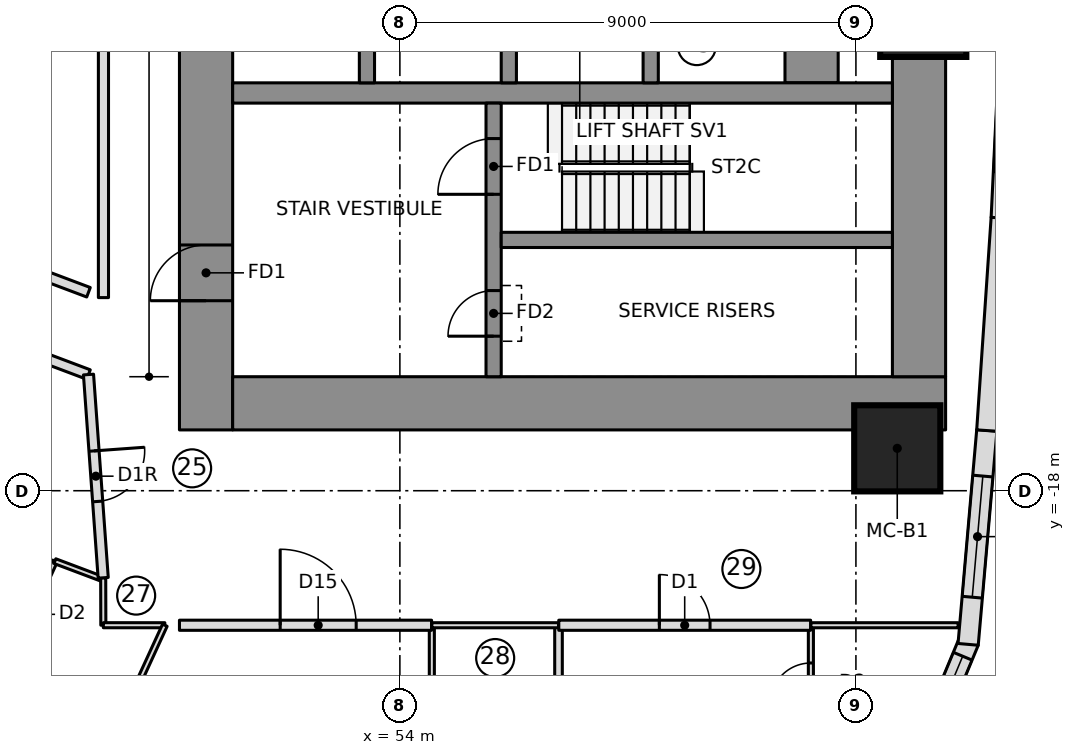
"""IFC4 building model, lengths in metres.
Left out: names, types, materials, properties, quantities, classifications, styles, units other than length and angle.
Written with IfcOpenShell. Run it as: python <this file> out.ifc"""

import sys

from ifc_helpers import new_model, si_unit, direction, frame, frame_2d, origin, origin_2d, place, context, subcontext, project, spatial, polyline, rectangle, outline, extrude, element, fill, save


model = new_model("IFC4")
c1 = context("Model", 3, precision=1e-05, world=origin(), true_north=direction((0.0, 1.0)))
c2 = subcontext(c1, "Body", "Model", "MODEL_VIEW")
j1 = project(units=[si_unit("LENGTHUNIT", "METRE"), si_unit("PLANEANGLEUNIT", "RADIAN")], contexts=[c1])
p1 = place(None, origin())
s1 = spatial("IfcSite", under=j1, at=p1, CompositionType="ELEMENT")
p2 = place(p1, origin())
s2 = spatial("IfcBuilding", under=s1, at=p2, CompositionType="ELEMENT")
p3 = place(p2, frame((0.0, 0.0, 88.45)))
s3 = spatial("IfcBuildingStorey", under=s2, at=p3, CompositionType="ELEMENT", Elevation=88.45)
p4 = place(p3, frame((50.175, -16.8, 0.0), z_axis=(0.0, 0.0, 1.0), x_axis=(0.0, 1.0, 0.0)))
e1 = element("IfcWall", 1, at=p4, inside=s3, PredefinedType="SHEAR", context=c2, shape_type="SweptSolid", body=[
    extrude(rectangle(XDim=10.15, YDim=1.05, at=frame_2d((5.075, 0.0))), origin(), (0.0, 0.0, 1.0), 3.55),
])
p5 = place(p4, frame((2.55, 0.0, 0.0)))
e2 = element("IfcOpeningElement", 2, at=p5, cuts=e1, PredefinedType="OPENING", context=c2, shape_type="SweptSolid", body=[
    extrude(rectangle(XDim=1.1, YDim=2.1, at=frame_2d((0.55, 1.05))), frame((0.0, 0.535, 0.0), z_axis=(0.0, -1.0, 0.0), x_axis=(1.0, 0.0, 0.0)), (0.0, 0.0, 1.0), 1.07),
])
p6 = place(p3, frame((50.7, -16.275, 0.0), z_axis=(0.0, 0.0, 1.0), x_axis=(1.0, 0.0, 0.0)))
e3 = element("IfcWall", 3, at=p6, inside=s3, PredefinedType="SHEAR", context=c2, shape_type="SweptSolid", body=[
    extrude(rectangle(XDim=14.07, YDim=1.05, at=frame_2d((7.035, 0.0))), origin(), (0.0, 0.0, 1.0), 3.55),
])
p7 = place(p3, frame((64.245, -15.75, 0.0), z_axis=(0.0, 0.0, 1.0), x_axis=(0.0, 1.0, 0.0)))
e4 = element("IfcWall", 4, at=p7, inside=s3, PredefinedType="SHEAR", context=c2, shape_type="SweptSolid", body=[
    extrude(rectangle(XDim=6.361, YDim=1.05, at=frame_2d((3.181, 0.0))), origin(), (0.0, 0.0, 1.0), 3.55),
])
p8 = place(p3, frame((62.125, -9.95, 0.0), z_axis=(0.0, 0.0, 1.0), x_axis=(0.0, 1.0, 0.0)))
e5 = element("IfcWall", 5, at=p8, inside=s3, PredefinedType="SHEAR", context=c2, shape_type="SweptSolid", body=[
    extrude(rectangle(XDim=19.9, YDim=1.05, at=frame_2d((9.95, 0.0))), origin(), (0.0, 0.0, 1.0), 3.55),
])
p9 = place(p3, frame((50.7, -10.15, 0.0), z_axis=(0.0, 0.0, 1.0), x_axis=(1.0, 0.0, 0.0)))
e6 = element("IfcWall", 6, at=p9, inside=s3, PredefinedType="SHEAR", context=c2, shape_type="SweptSolid", body=[
    extrude(rectangle(XDim=13.02, YDim=0.4, at=frame_2d((6.51, 0.0))), origin(), (0.0, 0.0, 1.0), 3.55),
])
for number, where, z_axis, x_axis in (
    (7, (53.35, -9.95, 0.0), (0.0, 0.0, 1.0), (0.0, 1.0, 0.0)),
    (8, (56.15, -9.95, 0.0), (0.0, 0.0, 1.0), (0.0, 1.0, 0.0)),
    (9, (58.95, -9.95, 0.0), (0.0, 0.0, 1.0), (0.0, 1.0, 0.0)),
):
    element("IfcWall", number, at=place(p3, frame(where, z_axis=z_axis, x_axis=x_axis)), inside=s3, PredefinedType="SHEAR", context=c2, shape_type="SweptSolid", body=[
        extrude(rectangle(XDim=3.0, YDim=0.3, at=frame_2d((1.5, 0.0))), origin(), (0.0, 0.0, 1.0), 3.55),
    ])
p10 = place(p3, frame((55.85, -15.75, 0.0), z_axis=(0.0, 0.0, 1.0), x_axis=(0.0, 1.0, 0.0)))
e10 = element("IfcWall", 10, at=p10, inside=s3, PredefinedType="SHEAR", context=c2, shape_type="SweptSolid", body=[
    extrude(rectangle(XDim=5.4, YDim=0.3, at=frame_2d((2.7, 0.0))), origin(), (0.0, 0.0, 1.0), 3.55),
])
p11 = place(p10, frame((3.6, 0.0, 0.0)))
e11 = element("IfcOpeningElement", 11, at=p11, cuts=e10, PredefinedType="OPENING", context=c2, shape_type="SweptSolid", body=[
    extrude(rectangle(XDim=1.1, YDim=2.1, at=frame_2d((0.55, 1.05))), frame((0.0, 0.16, 0.0), z_axis=(0.0, -1.0, 0.0), x_axis=(1.0, 0.0, 0.0)), (0.0, 0.0, 1.0), 0.32),
])
p12 = place(p10, frame((0.8, 0.0, 0.0)))
e12 = element("IfcOpeningElement", 12, at=p12, cuts=e10, PredefinedType="OPENING", context=c2, shape_type="SweptSolid", body=[
    extrude(rectangle(XDim=0.9, YDim=2.1, at=frame_2d((0.45, 1.05))), frame((0.0, 0.16, 0.0), z_axis=(0.0, -1.0, 0.0), x_axis=(1.0, 0.0, 0.0)), (0.0, 0.0, 1.0), 0.32),
])
p13 = place(p3, frame((56.0, -13.05, 0.0), z_axis=(0.0, 0.0, 1.0), x_axis=(1.0, 0.0, 0.0)))
e13 = element("IfcWall", 13, at=p13, inside=s3, PredefinedType="SHEAR", context=c2, shape_type="SweptSolid", body=[
    extrude(rectangle(XDim=7.72, YDim=0.3, at=frame_2d((3.86, 0.0))), origin(), (0.0, 0.0, 1.0), 3.55),
])
for number, where, z_axis, x_axis in (
    (14, (63.816, -17.164, 0.0), (0.0, 0.0, 1.0), (1.0, 0.0, 0.0)),
    (15, (64.329, -8.589, 0.0), (0.0, 0.0, 1.0), (1.0, 0.0, 0.0)),
):
    element("IfcColumn", number, at=place(p3, frame(where, z_axis=z_axis, x_axis=x_axis)), inside=s3, PredefinedType="COLUMN", context=c2, shape_type="SweptSolid", body=[
        extrude(rectangle(XDim=1.7, YDim=1.7, at=origin_2d()), origin(), (0.0, 0.0, 1.0), 3.55),
    ])
p14 = place(p3, frame((63.59, -24.916, 0.0), z_axis=(0.0, 0.0, 1.0), x_axis=(0.383997751971, 0.923334027577, 0.0)))
e16 = element("IfcWall", 16, at=p14, inside=s3, PredefinedType="NOTDEFINED", context=c2, shape_type="SweptSolid", body=[
    extrude(outline(polyline([(-0.061, -0.2), (4.27, -0.2), (4.208, 0.2), (0.061, 0.2), (-0.061, -0.2)])), origin(), (0.0, 0.0, 1.0), 3.25),
])
p15 = place(p14, frame((1.852, 0.0, 0.6)))
e17 = element("IfcOpeningElement", 17, at=p15, cuts=e16, PredefinedType="OPENING", context=c2, shape_type="SweptSolid", body=[
    extrude(outline(polyline([(0.0, 1.4), (0.08, 1.802), (0.308, 2.142), (0.648, 2.37), (1.05, 2.45), (1.452, 2.37), (1.792, 2.142), (2.02, 1.802), (2.1, 1.4), (2.1, 1.05), (2.02, 0.648), (1.792, 0.308), (1.452, 0.08), (1.05, 0.0), (0.648, 0.08), (0.308, 0.308), (0.08, 0.648), (0.0, 1.05), (0.0, 1.4)])), frame((0.0, 0.21, 0.0), z_axis=(0.0, -1.0, 0.0), x_axis=(1.0, 0.0, 0.0)), (0.0, 0.0, 1.0), 0.42),
])
p16 = place(p3, frame((65.217, -21.002, 0.0), z_axis=(0.0, 0.0, 1.0), x_axis=(0.086992730434, 0.996208946382, 0.0)))
e18 = element("IfcWall", 18, at=p16, inside=s3, PredefinedType="NOTDEFINED", context=c2, shape_type="SweptSolid", body=[
    extrude(outline(polyline([(-0.031, -0.2), (4.209, -0.2), (4.205, 0.2), (0.031, 0.2), (-0.031, -0.2)])), origin(), (0.0, 0.0, 1.0), 3.25),
])
p17 = place(p16, frame((0.903, 0.0, 0.5)))
e19 = element("IfcOpeningElement", 19, at=p17, cuts=e18, PredefinedType="OPENING", context=c2, shape_type="SweptSolid", body=[
    extrude(rectangle(XDim=2.4, YDim=2.0, at=frame_2d((1.2, 1.0))), frame((0.0, 0.21, 0.0), z_axis=(0.0, -1.0, 0.0), x_axis=(1.0, 0.0, 0.0)), (0.0, 0.0, 1.0), 0.42),
])
p18 = place(p3, frame((65.583, -16.811, 0.0), z_axis=(0.0, 0.0, 1.0), x_axis=(0.067724559895, 0.997704056315, 0.0)))
e20 = element("IfcWall", 20, at=p18, inside=s3, PredefinedType="NOTDEFINED", context=c2, shape_type="SweptSolid", body=[
    extrude(outline(polyline([(-0.002, -0.2), (4.209, -0.2), (4.205, 0.2), (0.002, 0.2), (-0.002, -0.2)])), origin(), (0.0, 0.0, 1.0), 3.25),
])
p19 = place(p3, frame((65.868, -12.614, 0.0), z_axis=(0.0, 0.0, 1.0), x_axis=(0.048342691508, 0.998830808585, 0.0)))
e21 = element("IfcWall", 21, at=p19, inside=s3, PredefinedType="NOTDEFINED", context=c2, shape_type="SweptSolid", body=[
    extrude(outline(polyline([(-0.002, -0.2), (4.209, -0.2), (4.205, 0.2), (0.002, 0.2), (-0.002, -0.2)])), origin(), (0.0, 0.0, 1.0), 3.25),
])
p20 = place(p19, frame((0.903, 0.0, 0.5)))
e22 = element("IfcOpeningElement", 22, at=p20, cuts=e21, PredefinedType="OPENING", context=c2, shape_type="SweptSolid", body=[
    extrude(rectangle(XDim=2.4, YDim=2.0, at=frame_2d((1.2, 1.0))), frame((0.0, 0.21, 0.0), z_axis=(0.0, -1.0, 0.0), x_axis=(1.0, 0.0, 0.0)), (0.0, 0.0, 1.0), 0.42),
])
p21 = place(p3, frame((54.631, -22.95, 0.0), z_axis=(0.0, 0.0, 1.0), x_axis=(0.0, 1.0, 0.0)))
e23 = element("IfcWall", 23, at=p21, inside=s3, PredefinedType="PARTITIONING", context=c2, shape_type="SweptSolid", body=[
    extrude(rectangle(XDim=2.3, YDim=0.1, at=frame_2d((1.15, 0.0))), origin(), (0.0, 0.0, 1.0), 3.25),
])
p22 = place(p3, frame((62.111, -22.95, 0.0), z_axis=(0.0, 0.0, 1.0), x_axis=(0.0, 1.0, 0.0)))
e24 = element("IfcWall", 24, at=p22, inside=s3, PredefinedType="PARTITIONING", context=c2, shape_type="SweptSolid", body=[
    extrude(rectangle(XDim=2.3, YDim=0.1, at=frame_2d((1.15, 0.0))), origin(), (0.0, 0.0, 1.0), 3.25),
])
p23 = place(p22, frame((0.75, 0.0, 0.0)))
e25 = element("IfcOpeningElement", 25, at=p23, cuts=e24, PredefinedType="OPENING", context=c2, shape_type="SweptSolid", body=[
    extrude(rectangle(XDim=0.8, YDim=2.1, at=frame_2d((0.4, 1.05))), frame((0.0, 0.06, 0.0), z_axis=(0.0, -1.0, 0.0), x_axis=(1.0, 0.0, 0.0)), (0.0, 0.0, 1.0), 0.12),
])
p24 = place(p3, frame((57.131, -26.979, 0.0), z_axis=(0.0, 0.0, 1.0), x_axis=(0.0, 1.0, 0.0)))
e26 = element("IfcWall", 26, at=p24, inside=s3, PredefinedType="PARTITIONING", context=c2, shape_type="SweptSolid", body=[
    extrude(rectangle(XDim=6.329, YDim=0.15, at=frame_2d((3.165, 0.0))), origin(), (0.0, 0.0, 1.0), 3.25),
])
p25 = place(p3, frame((46.229, -21.485, 0.0), z_axis=(0.0, 0.0, 1.0), x_axis=(0.417405650341, 0.908720266674, 0.0)))
e27 = element("IfcWall", 27, at=p25, inside=s3, PredefinedType="PARTITIONING", context=c2, shape_type="SweptSolid", body=[
    extrude(rectangle(XDim=2.306, YDim=0.1, at=frame_2d((1.153, 0.0))), origin(), (0.0, 0.0, 1.0), 3.25),
])
p26 = place(p25, frame((0.75, 0.0, 0.0)))
e28 = element("IfcOpeningElement", 28, at=p26, cuts=e27, PredefinedType="OPENING", context=c2, shape_type="SweptSolid", body=[
    extrude(rectangle(XDim=0.8, YDim=2.1, at=frame_2d((0.4, 1.05))), frame((0.0, 0.06, 0.0), z_axis=(0.0, -1.0, 0.0), x_axis=(1.0, 0.0, 0.0)), (0.0, 0.0, 1.0), 0.12),
])
p27 = place(p3, frame((47.192, -19.39, 0.0), z_axis=(0.0, 0.0, 1.0), x_axis=(0.935855998994, -0.352382674301, 0.0)))
e29 = element("IfcWall", 29, at=p27, inside=s3, PredefinedType="PARTITIONING", context=c2, shape_type="SweptSolid", body=[
    extrude(rectangle(XDim=0.998, YDim=0.1, at=frame_2d((0.499, 0.0))), origin(), (0.0, 0.0, 1.0), 3.25),
])
p28 = place(p3, frame((48.123, -22.198, 0.0), z_axis=(0.0, 0.0, 1.0), x_axis=(-0.935872177073, 0.352339705654, 0.0)))
e30 = element("IfcWall", 30, at=p28, inside=s3, PredefinedType="PARTITIONING", context=c2, shape_type="SweptSolid", body=[
    extrude(rectangle(XDim=2.023, YDim=0.1, at=frame_2d((1.012, 0.0))), origin(), (0.0, 0.0, 1.0), 3.25),
])
p29 = place(p3, frame((49.65, -20.655, 0.0), z_axis=(0.0, 0.0, 1.0), x_axis=(1.0, 0.0, 0.0)))
e31 = element("IfcWall", 31, at=p29, inside=s3, PredefinedType="PARTITIONING", context=c2, shape_type="SweptSolid", body=[
    extrude(rectangle(XDim=4.976, YDim=0.2, at=frame_2d((2.488, 0.0))), origin(), (0.0, 0.0, 1.0), 3.25),
])
p30 = place(p29, frame((1.988, 0.0, 0.0)))
e32 = element("IfcOpeningElement", 32, at=p30, cuts=e31, PredefinedType="OPENING", context=c2, shape_type="SweptSolid", body=[
    extrude(rectangle(XDim=1.5, YDim=2.1, at=frame_2d((0.75, 1.05))), frame((0.0, 0.11, 0.0), z_axis=(0.0, -1.0, 0.0), x_axis=(1.0, 0.0, 0.0)), (0.0, 0.0, 1.0), 0.22),
])
p31 = place(p3, frame((57.135, -20.655, 0.0), z_axis=(0.0, 0.0, 1.0), x_axis=(1.0, 0.0, 0.0)))
e33 = element("IfcWall", 33, at=p31, inside=s3, PredefinedType="PARTITIONING", context=c2, shape_type="SweptSolid", body=[
    extrude(rectangle(XDim=4.971, YDim=0.2, at=frame_2d((2.485, 0.0))), origin(), (0.0, 0.0, 1.0), 3.25),
])
p32 = place(p31, frame((1.985, 0.0, 0.0)))
e34 = element("IfcOpeningElement", 34, at=p32, cuts=e33, PredefinedType="OPENING", context=c2, shape_type="SweptSolid", body=[
    extrude(rectangle(XDim=1.0, YDim=2.1, at=frame_2d((0.5, 1.05))), frame((0.0, 0.11, 0.0), z_axis=(0.0, -1.0, 0.0), x_axis=(1.0, 0.0, 0.0)), (0.0, 0.0, 1.0), 0.22),
])
p33 = place(p3, frame((54.631, -20.655, 0.0), z_axis=(0.0, 0.0, 1.0), x_axis=(1.0, 0.0, 0.0)))
e35 = element("IfcWall", 35, at=p33, inside=s3, PredefinedType="PARTITIONING", context=c2, shape_type="SweptSolid", body=[
    extrude(rectangle(XDim=2.5, YDim=0.1, at=frame_2d((1.25, 0.0))), origin(), (0.0, 0.0, 1.0), 3.25),
])
p34 = place(p3, frame((62.111, -20.655, 0.0), z_axis=(0.0, 0.0, 1.0), x_axis=(1.0, 0.0, 0.0)))
e36 = element("IfcWall", 36, at=p34, inside=s3, PredefinedType="PARTITIONING", context=c2, shape_type="SweptSolid", body=[
    extrude(rectangle(XDim=2.906, YDim=0.1, at=frame_2d((1.453, 0.0))), origin(), (0.0, 0.0, 1.0), 3.25),
])
p35 = place(p3, frame((48.145, -19.719, 0.0), z_axis=(0.0, 0.0, 1.0), x_axis=(0.002870551847, -0.999995879958, 0.0)))
e37 = element("IfcWall", 37, at=p35, inside=s3, PredefinedType="PARTITIONING", context=c2, shape_type="SweptSolid", body=[
    extrude(rectangle(XDim=0.936, YDim=0.1, at=frame_2d((0.468, 0.0))), origin(), (0.0, 0.0, 1.0), 3.25),
])
p36 = place(p3, frame((48.148, -20.654, 0.0), z_axis=(0.0, 0.0, 1.0), x_axis=(0.999999817967, -0.000603378812, 0.0)))
e38 = element("IfcWall", 38, at=p36, inside=s3, PredefinedType="PARTITIONING", context=c2, shape_type="SweptSolid", body=[
    extrude(rectangle(XDim=1.214, YDim=0.1, at=frame_2d((0.607, 0.0))), origin(), (0.0, 0.0, 1.0), 3.25),
])
p37 = place(p3, frame((49.362, -20.655, 0.0), z_axis=(0.0, 0.0, 1.0), x_axis=(-0.417439151459, -0.90870487774, 0.0)))
e39 = element("IfcWall", 39, at=p37, inside=s3, PredefinedType="PARTITIONING", context=c2, shape_type="SweptSolid", body=[
    extrude(rectangle(XDim=1.875, YDim=0.1, at=frame_2d((0.938, 0.0))), origin(), (0.0, 0.0, 1.0), 3.25),
])
p38 = place(p3, frame((46.924, -15.357, 0.0), z_axis=(0.0, 0.0, 1.0), x_axis=(0.935803526171, -0.35252199989, 0.0)))
e40 = element("IfcWall", 40, at=p38, inside=s3, PredefinedType="PARTITIONING", context=c2, shape_type="SweptSolid", body=[
    extrude(rectangle(XDim=0.995, YDim=0.2, at=frame_2d((0.497, 0.0))), origin(), (0.0, 0.0, 1.0), 3.25),
])
p39 = place(p3, frame((47.855, -14.083, 0.0), z_axis=(0.0, 0.0, 1.0), x_axis=(-0.935907269358, 0.352246480696, 0.0)))
e41 = element("IfcWall", 41, at=p39, inside=s3, PredefinedType="PARTITIONING", context=c2, shape_type="SweptSolid", body=[
    extrude(rectangle(XDim=1.239, YDim=0.2, at=frame_2d((0.619, 0.0))), origin(), (0.0, 0.0, 1.0), 3.25),
])
p40 = place(p3, frame((47.855, -15.707, 0.0), z_axis=(0.0, 0.0, 1.0), x_axis=(0.072114108047, -0.997396388313, 0.0)))
e42 = element("IfcWall", 42, at=p40, inside=s3, PredefinedType="PARTITIONING", context=c2, shape_type="SweptSolid", body=[
    extrude(rectangle(XDim=4.022, YDim=0.2, at=frame_2d((2.011, 0.0))), origin(), (0.0, 0.0, 1.0), 3.25),
])
p41 = place(p40, frame((1.511, 0.0, 0.0)))
e43 = element("IfcOpeningElement", 43, at=p41, cuts=e42, PredefinedType="OPENING", context=c2, shape_type="SweptSolid", body=[
    extrude(rectangle(XDim=1.0, YDim=2.1, at=frame_2d((0.5, 1.05))), frame((0.0, 0.11, 0.0), z_axis=(0.0, -1.0, 0.0), x_axis=(1.0, 0.0, 0.0)), (0.0, 0.0, 1.0), 0.22),
])
p42 = place(p3, frame((48.15, 14.189, 0.0), z_axis=(0.0, 0.0, 1.0), x_axis=(0.0, -1.0, 0.0)))
e44 = element("IfcWall", 44, at=p42, inside=s3, PredefinedType="PARTITIONING", context=c2, shape_type="SweptSolid", body=[
    extrude(rectangle(XDim=28.377, YDim=0.2, at=frame_2d((14.189, 0.0))), origin(), (0.0, 0.0, 1.0), 3.25),
])
p43 = place(p15, origin())
e45 = element("IfcWindow", 45, at=p43, inside=s3, PartitioningType="SINGLE_PANEL", PredefinedType="WINDOW", context=c2, shape_type="SweptSolid", body=[
    extrude(outline(polyline([(0.0, 1.4), (0.08, 1.802), (0.308, 2.142), (0.648, 2.37), (1.05, 2.45), (1.452, 2.37), (1.792, 2.142), (2.02, 1.802), (2.1, 1.4), (2.1, 1.05), (2.02, 0.648), (1.792, 0.308), (1.452, 0.08), (1.05, 0.0), (0.648, 0.08), (0.308, 0.308), (0.08, 0.648), (0.0, 1.05), (0.0, 1.4)])), frame((0.0, 0.17, 0.0), z_axis=(0.0, -1.0, 0.0), x_axis=(1.0, 0.0, 0.0)), (0.0, 0.0, 1.0), 0.06),
])
fill(e17, e45)
p44 = place(p17, origin())
e46 = element("IfcWindow", 46, at=p44, inside=s3, PartitioningType="SINGLE_PANEL", PredefinedType="WINDOW", context=c2, shape_type="SweptSolid", body=[
    extrude(rectangle(XDim=2.4, YDim=2.0, at=frame_2d((1.2, 1.0))), frame((0.0, 0.17, 0.0), z_axis=(0.0, -1.0, 0.0), x_axis=(1.0, 0.0, 0.0)), (0.0, 0.0, 1.0), 0.06),
])
fill(e19, e46)
p45 = place(p20, origin())
e47 = element("IfcWindow", 47, at=p45, inside=s3, PartitioningType="SINGLE_PANEL", PredefinedType="WINDOW", context=c2, shape_type="SweptSolid", body=[
    extrude(rectangle(XDim=2.4, YDim=2.0, at=frame_2d((1.2, 1.0))), frame((0.0, 0.17, 0.0), z_axis=(0.0, -1.0, 0.0), x_axis=(1.0, 0.0, 0.0)), (0.0, 0.0, 1.0), 0.06),
])
fill(e22, e47)
p46 = place(p23, origin())
e48 = element("IfcDoor", 48, at=p46, inside=s3, OperationType="SINGLE_SWING_LEFT", PredefinedType="DOOR", context=c2, shape_type="SweptSolid", body=[
    extrude(rectangle(XDim=0.8, YDim=2.1, at=frame_2d((0.4, 1.05))), frame((0.0, 0.025, 0.0), z_axis=(0.0, -1.0, 0.0), x_axis=(1.0, 0.0, 0.0)), (0.0, 0.0, 1.0), 0.05),
])
fill(e25, e48)
p47 = place(p30, origin())
e49 = element("IfcDoor", 49, at=p47, inside=s3, OperationType="DOUBLE_DOOR_SINGLE_SWING", PredefinedType="DOOR", context=c2, shape_type="SweptSolid", body=[
    extrude(rectangle(XDim=1.5, YDim=2.1, at=frame_2d((0.75, 1.05))), frame((0.0, 0.025, 0.0), z_axis=(0.0, -1.0, 0.0), x_axis=(1.0, 0.0, 0.0)), (0.0, 0.0, 1.0), 0.05),
])
fill(e32, e49)
p48 = place(p32, origin())
e50 = element("IfcDoor", 50, at=p48, inside=s3, OperationType="SINGLE_SWING_LEFT", PredefinedType="DOOR", context=c2, shape_type="SweptSolid", body=[
    extrude(rectangle(XDim=1.0, YDim=2.1, at=frame_2d((0.5, 1.05))), frame((0.0, 0.025, 0.0), z_axis=(0.0, -1.0, 0.0), x_axis=(1.0, 0.0, 0.0)), (0.0, 0.0, 1.0), 0.05),
])
fill(e34, e50)
p49 = place(p41, origin())
e51 = element("IfcDoor", 51, at=p49, inside=s3, OperationType="SINGLE_SWING_RIGHT", PredefinedType="DOOR", context=c2, shape_type="SweptSolid", body=[
    extrude(rectangle(XDim=1.0, YDim=2.1, at=frame_2d((0.5, 1.05))), frame((0.0, 0.025, 0.0), z_axis=(0.0, -1.0, 0.0), x_axis=(1.0, 0.0, 0.0)), (0.0, 0.0, 1.0), 0.05),
])
fill(e43, e51)
p50 = place(p11, origin())
e52 = element("IfcDoor", 52, at=p50, inside=s3, OperationType="SINGLE_SWING_RIGHT", PredefinedType="DOOR", context=c2, shape_type="SweptSolid", body=[
    extrude(rectangle(XDim=1.1, YDim=2.1, at=frame_2d((0.55, 1.05))), frame((0.0, 0.025, 0.0), z_axis=(0.0, -1.0, 0.0), x_axis=(1.0, 0.0, 0.0)), (0.0, 0.0, 1.0), 0.05),
])
fill(e11, e52)
p51 = place(p5, origin())
e53 = element("IfcDoor", 53, at=p51, inside=s3, OperationType="SINGLE_SWING_RIGHT", PredefinedType="DOOR", context=c2, shape_type="SweptSolid", body=[
    extrude(rectangle(XDim=1.1, YDim=2.1, at=frame_2d((0.55, 1.05))), frame((0.0, 0.025, 0.0), z_axis=(0.0, -1.0, 0.0), x_axis=(1.0, 0.0, 0.0)), (0.0, 0.0, 1.0), 0.05),
])
fill(e2, e53)
p52 = place(p12, origin())
e54 = element("IfcDoor", 54, at=p52, inside=s3, OperationType="SINGLE_SWING_LEFT", PredefinedType="DOOR", context=c2, shape_type="SweptSolid", body=[
    extrude(rectangle(XDim=0.9, YDim=2.1, at=frame_2d((0.45, 1.05))), frame((0.0, 0.025, 0.0), z_axis=(0.0, -1.0, 0.0), x_axis=(1.0, 0.0, 0.0)), (0.0, 0.0, 1.0), 0.05),
])
fill(e12, e54)
save(model, sys.argv[1])
